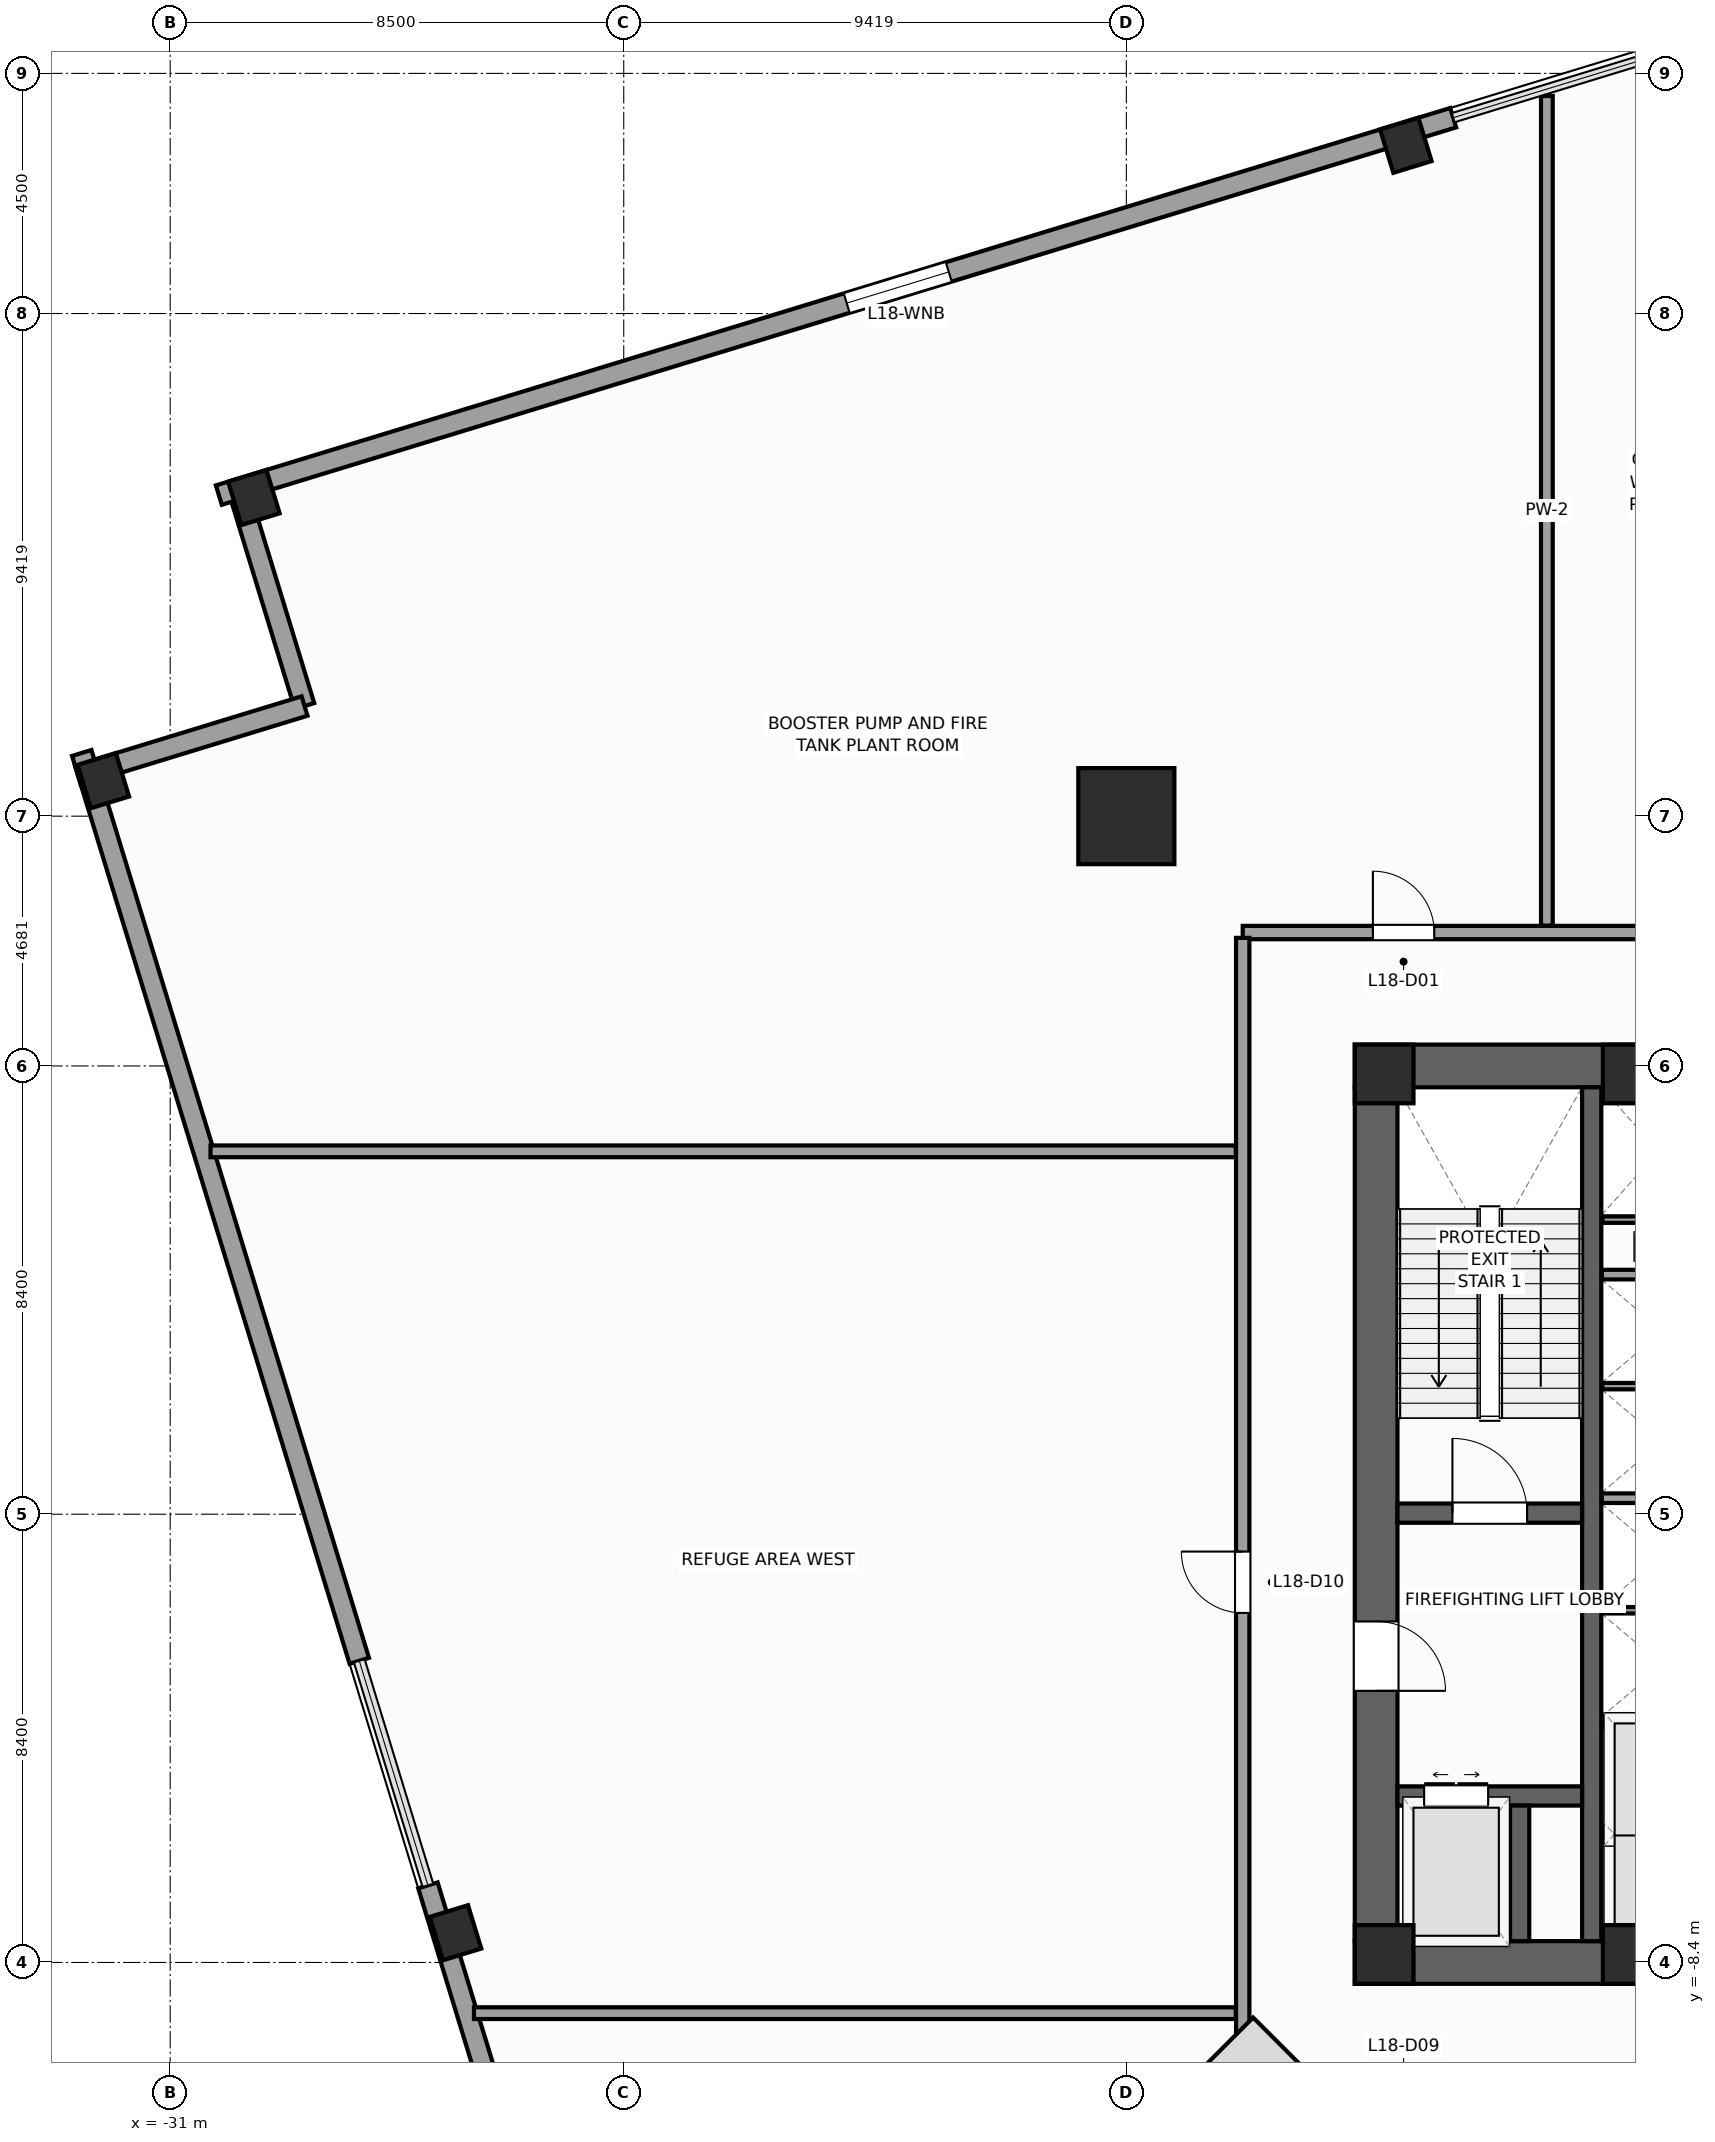
"""IFC4 building model, lengths in metres.
Left out: names, types, materials, properties, quantities, classifications, styles, units other than length and angle.
Written with IfcOpenShell. Run it as: python <this file> out.ifc"""

import sys

from ifc_helpers import new_model, si_unit, direction, frame, frame_2d, origin, origin_2d, place, context, subcontext, project, spatial, rectangle, extrude, source, transform, mapped, element, fill, save


model = new_model("IFC4")
c1 = context("Model", 3, precision=1e-05, world=origin(), true_north=direction((0.0, 1.0)))
c2 = subcontext(c1, "Body", "Model", "MODEL_VIEW")
j1 = project(units=[si_unit("LENGTHUNIT", "METRE"), si_unit("PLANEANGLEUNIT", "RADIAN")], contexts=[c1])
p1 = place(None, origin())
s1 = spatial("IfcSite", under=j1, at=p1, CompositionType="ELEMENT")
p2 = place(p1, origin())
s2 = spatial("IfcBuilding", under=s1, at=p2, CompositionType="ELEMENT")
p3 = place(p2, frame((0.0, 0.0, 78.0)))
s3 = spatial("IfcBuildingStorey", under=s2, at=p3, CompositionType="ELEMENT", Elevation=78.0)
p4 = place(p3, frame((-8.8, -8.4, 0.0), z_axis=(0.0, 0.0, 1.0), x_axis=(1.0, 0.0, 0.0)))
e1 = element("IfcWall", 1, at=p4, inside=s3, PredefinedType="SHEAR", context=c2, shape_type="SweptSolid", body=[
    extrude(rectangle(XDim=17.6, YDim=0.8, at=frame_2d((8.8, 0.0))), origin(), (0.0, 0.0, 1.0), 5.2),
])
p5 = place(p4, frame((8.15, 0.0, 0.0)))
e2 = element("IfcOpeningElement", 2, at=p5, cuts=e1, PredefinedType="OPENING", context=c2, shape_type="SweptSolid", body=[
    extrude(rectangle(XDim=1.3, YDim=2.2, at=frame_2d((0.65, 1.1))), frame((0.0, 0.41, 0.0), z_axis=(0.0, -1.0, 0.0), x_axis=(1.0, 0.0, 0.0)), (0.0, 0.0, 1.0), 0.82),
])
p6 = place(p3, frame((-8.8, 8.4, 0.0), z_axis=(0.0, 0.0, 1.0), x_axis=(1.0, 0.0, 0.0)))
e3 = element("IfcWall", 3, at=p6, inside=s3, PredefinedType="SHEAR", context=c2, shape_type="SweptSolid", body=[
    extrude(rectangle(XDim=17.6, YDim=0.8, at=frame_2d((8.8, 0.0))), origin(), (0.0, 0.0, 1.0), 5.2),
])
p7 = place(p3, frame((-8.4, -8.0, 0.0), z_axis=(0.0, 0.0, 1.0), x_axis=(0.0, 1.0, 0.0)))
e4 = element("IfcWall", 4, at=p7, inside=s3, PredefinedType="SHEAR", context=c2, shape_type="SweptSolid", body=[
    extrude(rectangle(XDim=16.0, YDim=0.8, at=frame_2d((8.0, 0.0))), origin(), (0.0, 0.0, 1.0), 5.2),
])
p8 = place(p7, frame((4.69, 0.0, 0.0)))
e5 = element("IfcOpeningElement", 5, at=p8, cuts=e4, PredefinedType="OPENING", context=c2, shape_type="SweptSolid", body=[
    extrude(rectangle(XDim=1.3, YDim=2.2, at=frame_2d((0.65, 1.1))), frame((0.0, 0.41, 0.0), z_axis=(0.0, -1.0, 0.0), x_axis=(1.0, 0.0, 0.0)), (0.0, 0.0, 1.0), 0.82),
])
p9 = place(p3, frame((-4.36, -8.0, 0.0), z_axis=(0.0, 0.0, 1.0), x_axis=(0.0, 1.0, 0.0)))
e6 = element("IfcWall", 6, at=p9, inside=s3, PredefinedType="SHEAR", context=c2, shape_type="SweptSolid", body=[
    extrude(rectangle(XDim=16.0, YDim=0.36, at=frame_2d((8.0, 0.0))), origin(), (0.0, 0.0, 1.0), 5.2),
])
p10 = place(p3, frame((-8.0, 0.02, 0.0), z_axis=(0.0, 0.0, 1.0), x_axis=(1.0, 0.0, 0.0)))
e7 = element("IfcWall", 7, at=p10, inside=s3, PredefinedType="SHEAR", context=c2, shape_type="SweptSolid", body=[
    extrude(rectangle(XDim=3.46, YDim=0.36, at=frame_2d((1.73, 0.0))), origin(), (0.0, 0.0, 1.0), 5.2),
])
p11 = place(p10, frame((1.03, 0.0, 0.0)))
e8 = element("IfcOpeningElement", 8, at=p11, cuts=e7, PredefinedType="OPENING", context=c2, shape_type="SweptSolid", body=[
    extrude(rectangle(XDim=1.4, YDim=2.2, at=frame_2d((0.7, 1.1))), frame((0.0, 0.19, 0.0), z_axis=(0.0, -1.0, 0.0), x_axis=(1.0, 0.0, 0.0)), (0.0, 0.0, 1.0), 0.38),
])
p12 = place(p3, frame((-8.0, -5.28, 0.0), z_axis=(0.0, 0.0, 1.0), x_axis=(1.0, 0.0, 0.0)))
e9 = element("IfcWall", 9, at=p12, inside=s3, PredefinedType="SHEAR", context=c2, shape_type="SweptSolid", body=[
    extrude(rectangle(XDim=3.46, YDim=0.36, at=frame_2d((1.73, 0.0))), origin(), (0.0, 0.0, 1.0), 5.2),
])
p13 = place(p12, frame((0.5, 0.0, 0.0)))
e10 = element("IfcOpeningElement", 10, at=p13, cuts=e9, PredefinedType="OPENING", context=c2, shape_type="SweptSolid", body=[
    extrude(rectangle(XDim=1.2, YDim=2.25, at=frame_2d((0.6, 1.125))), frame((0.0, 0.19, 0.0), z_axis=(0.0, -1.0, 0.0), x_axis=(1.0, 0.0, 0.0)), (0.0, 0.0, 1.0), 0.38),
])
p14 = place(p3, frame((-5.71, -8.0, 0.0), z_axis=(0.0, 0.0, 1.0), x_axis=(0.0, 1.0, 0.0)))
e11 = element("IfcWall", 11, at=p14, inside=s3, PredefinedType="SHEAR", context=c2, shape_type="SweptSolid", body=[
    extrude(rectangle(XDim=2.54, YDim=0.36, at=frame_2d((1.27, 0.0))), origin(), (0.0, 0.0, 1.0), 5.2),
])
m1 = source(origin(), c2, "Body", "SweptSolid", [
    extrude(rectangle(XDim=1.1, YDim=1.1, at=origin_2d()), origin(), (0.0, 0.0, 1.0), 5.2),
])
for number, where, z_axis, x_axis in (
    (12, (-8.25, -8.25, 0.0), (0.0, 0.0, 1.0), (1.0, 0.0, 0.0)),
    (13, (-8.25, 8.25, 0.0), (0.0, 0.0, 1.0), (1.0, 0.0, 0.0)),
    (14, (-3.6, -8.25, 0.0), (0.0, 0.0, 1.0), (1.0, 0.0, 0.0)),
    (15, (-3.6, 8.25, 0.0), (0.0, 0.0, 1.0), (1.0, 0.0, 0.0)),
):
    element("IfcColumn", number, at=place(p3, frame(where, z_axis=z_axis, x_axis=x_axis)), inside=s3, PredefinedType="PILASTER", context=c2, shape_type="MappedRepresentation", body=[
        mapped(m1, transform((0.0, 0.0, 0.0), scale=1.0)),
    ])
m2 = source(origin(), c2, "Body", "SweptSolid", [
    extrude(rectangle(XDim=1.8, YDim=1.8, at=origin_2d()), origin(), (0.0, 0.0, 1.0), 5.2),
])
p15 = place(p3, frame((-13.081, 13.081, 0.0), z_axis=(0.0, 0.0, 1.0), x_axis=(1.0, 0.0, 0.0)))
e16 = element("IfcColumn", 16, at=p15, inside=s3, PredefinedType="COLUMN", context=c2, shape_type="MappedRepresentation", body=[
    mapped(m2, transform((0.0, 0.0, 0.0), scale=1.0)),
])
m3 = source(origin(), c2, "Body", "SweptSolid", [
    extrude(rectangle(XDim=0.75, YDim=0.85, at=origin_2d()), origin(), (0.0, 0.0, 1.0), 5.2),
])
for number, where, z_axis, x_axis in (
    (17, (-7.843, 25.653, 0.0), (0.0, 0.0, 1.0), (0.956, 0.292, 0.0)),
    (18, (-29.431, 19.052, 0.0), (0.0, 0.0, 1.0), (0.956, 0.292, 0.0)),
    (19, (-32.253, 13.746, 0.0), (0.0, 0.0, 1.0), (0.956, 0.292, 0.0)),
    (20, (-25.653, -7.843, 0.0), (0.0, 0.0, 1.0), (0.956, 0.292, 0.0)),
):
    element("IfcColumn", number, at=place(p3, frame(where, z_axis=z_axis, x_axis=x_axis)), inside=s3, PredefinedType="COLUMN", context=c2, shape_type="MappedRepresentation", body=[
        mapped(m3, transform((0.0, 0.0, 0.0), scale=1.0)),
    ])
p16 = place(p3, frame((-29.725, 19.208, 0.0), z_axis=(0.0, 0.0, 1.0), x_axis=(0.292345507338, -0.956312764915, 0.0)))
e21 = element("IfcWall", 21, at=p16, inside=s3, PredefinedType="STANDARD", context=c2, shape_type="SweptSolid", body=[
    extrude(rectangle(XDim=4.25, YDim=0.38, at=frame_2d((2.125, 0.0))), origin(), (0.0, 0.0, 1.0), 4.94),
])
p17 = place(p3, frame((-28.482, 15.144, 0.0), z_axis=(0.0, 0.0, 1.0), x_axis=(-0.956304176051, -0.292373601522, 0.0)))
e22 = element("IfcWall", 22, at=p17, inside=s3, PredefinedType="STANDARD", context=c2, shape_type="SweptSolid", body=[
    extrude(rectangle(XDim=4.44, YDim=0.38, at=frame_2d((2.22, 0.0))), origin(), (0.0, 0.0, 1.0), 4.24),
])
p18 = place(p3, frame((-6.955, 26.17, 0.0), z_axis=(0.0, 0.0, 1.0), x_axis=(-0.95630447169, -0.292372634538, 0.0)))
e23 = element("IfcWall", 23, at=p18, inside=s3, PredefinedType="STANDARD", context=c2, shape_type="SweptSolid", body=[
    extrude(rectangle(XDim=24.19, YDim=0.38, at=frame_2d((12.095, 0.0))), origin(), (0.0, 0.0, 1.0), 4.34),
])
p19 = place(p18, frame((9.885, 0.0, 0.65)))
e24 = element("IfcOpeningElement", 24, at=p19, cuts=e23, PredefinedType="OPENING", context=c2, shape_type="SweptSolid", body=[
    extrude(rectangle(XDim=2.0, YDim=1.45, at=frame_2d((1.0, 0.725))), frame((0.0, 0.2, 0.0), z_axis=(0.0, -1.0, 0.0), x_axis=(1.0, 0.0, 0.0)), (0.0, 0.0, 1.0), 0.4),
])
p20 = place(p3, frame((-32.658, 14.265, 0.0), z_axis=(0.0, 0.0, 1.0), x_axis=(0.292377517944, -0.956302978664, 0.0)))
e25 = element("IfcWall", 25, at=p20, inside=s3, PredefinedType="STANDARD", context=c2, shape_type="SweptSolid", body=[
    extrude(rectangle(XDim=17.79, YDim=0.38, at=frame_2d((8.895, 0.0))), origin(), (0.0, 0.0, 1.0), 4.34),
])
p21 = place(p3, frame((-26.17, -6.955, 0.0), z_axis=(0.0, 0.0, 1.0), x_axis=(0.292372634538, -0.95630447169, 0.0)))
e26 = element("IfcWall", 26, at=p21, inside=s3, PredefinedType="STANDARD", context=c2, shape_type="SweptSolid", body=[
    extrude(rectangle(XDim=24.19, YDim=0.38, at=frame_2d((12.095, 0.0))), origin(), (0.0, 0.0, 1.0), 4.34),
])
p22 = place(p21, frame((9.885, 0.0, 0.65)))
e27 = element("IfcOpeningElement", 27, at=p22, cuts=e26, PredefinedType="OPENING", context=c2, shape_type="SweptSolid", body=[
    extrude(rectangle(XDim=2.0, YDim=1.45, at=frame_2d((1.0, 0.725))), frame((0.0, 0.2, 0.0), z_axis=(0.0, -1.0, 0.0), x_axis=(1.0, 0.0, 0.0)), (0.0, 0.0, 1.0), 0.4),
])
for number, where, z_axis, x_axis in (
    (28, (-4.17, -3.9, 0.0), (0.0, 0.0, 1.0), (1.0, 0.0, 0.0)),
    (29, (-4.17, 0.3, 0.0), (0.0, 0.0, 1.0), (1.0, 0.0, 0.0)),
    (30, (-4.17, 4.49, 0.0), (0.0, 0.0, 1.0), (1.0, 0.0, 0.0)),
):
    element("IfcWall", number, at=place(p3, frame(where, z_axis=z_axis, x_axis=x_axis)), inside=s3, PredefinedType="PARTITIONING", context=c2, shape_type="SweptSolid", body=[
        extrude(rectangle(XDim=2.28, YDim=0.18, at=frame_2d((1.14, 0.0))), origin(), (0.0, 0.0, 1.0), 4.94),
    ])
for number, where, z_axis, x_axis in (
    (31, (-4.16, -6.0, 0.0), (0.0, 0.0, 1.0), (1.0, 0.0, 0.0)),
    (32, (-4.16, -1.8, 0.0), (0.0, 0.0, 1.0), (1.0, 0.0, 0.0)),
    (33, (-4.16, 2.4, 0.0), (0.0, 0.0, 1.0), (1.0, 0.0, 0.0)),
):
    element("IfcWall", number, at=place(p3, frame(where, z_axis=z_axis, x_axis=x_axis)), inside=s3, PredefinedType="PARTITIONING", context=c2, shape_type="SweptSolid", body=[
        extrude(rectangle(XDim=2.26, YDim=0.12, at=frame_2d((1.13, 0.0))), origin(), (0.0, 0.0, 1.0), 4.94),
    ])
p23 = place(p3, frame((-4.16, 5.52, 0.0), z_axis=(0.0, 0.0, 1.0), x_axis=(1.0, 0.0, 0.0)))
e34 = element("IfcWall", 34, at=p23, inside=s3, PredefinedType="PARTITIONING", context=c2, shape_type="SweptSolid", body=[
    extrude(rectangle(XDim=2.1, YDim=0.12, at=frame_2d((1.05, 0.0))), origin(), (0.0, 0.0, 1.0), 4.94),
])
p24 = place(p3, frame((-10.9, 10.9, 0.0), z_axis=(0.0, 0.0, 1.0), x_axis=(1.0, 0.0, 0.0)))
e35 = element("IfcWall", 35, at=p24, inside=s3, PredefinedType="PARTITIONING", context=c2, shape_type="SweptSolid", body=[
    extrude(rectangle(XDim=21.8, YDim=0.25, at=frame_2d((10.9, 0.0))), origin(), (0.0, 0.0, 1.0), 4.94),
])
p25 = place(p24, frame((2.439, 0.0, 0.0)))
e36 = element("IfcOpeningElement", 36, at=p25, cuts=e35, PredefinedType="OPENING", context=c2, shape_type="SweptSolid", body=[
    extrude(rectangle(XDim=1.15, YDim=2.25, at=frame_2d((0.575, 1.125))), frame((0.0, 0.135, 0.0), z_axis=(0.0, -1.0, 0.0), x_axis=(1.0, 0.0, 0.0)), (0.0, 0.0, 1.0), 0.27),
])
p26 = place(p24, frame((7.725, 0.0, 0.0)))
e37 = element("IfcOpeningElement", 37, at=p26, cuts=e35, PredefinedType="OPENING", context=c2, shape_type="SweptSolid", body=[
    extrude(rectangle(XDim=1.15, YDim=2.25, at=frame_2d((0.575, 1.125))), frame((0.0, 0.135, 0.0), z_axis=(0.0, -1.0, 0.0), x_axis=(1.0, 0.0, 0.0)), (0.0, 0.0, 1.0), 0.27),
])
p27 = place(p24, frame((12.925, 0.0, 0.0)))
e38 = element("IfcOpeningElement", 38, at=p27, cuts=e35, PredefinedType="OPENING", context=c2, shape_type="SweptSolid", body=[
    extrude(rectangle(XDim=1.15, YDim=2.25, at=frame_2d((0.575, 1.125))), frame((0.0, 0.135, 0.0), z_axis=(0.0, -1.0, 0.0), x_axis=(1.0, 0.0, 0.0)), (0.0, 0.0, 1.0), 0.27),
])
p28 = place(p24, frame((18.21, 0.0, 0.0)))
e39 = element("IfcOpeningElement", 39, at=p28, cuts=e35, PredefinedType="OPENING", context=c2, shape_type="SweptSolid", body=[
    extrude(rectangle(XDim=1.15, YDim=2.25, at=frame_2d((0.575, 1.125))), frame((0.0, 0.135, 0.0), z_axis=(0.0, -1.0, 0.0), x_axis=(1.0, 0.0, 0.0)), (0.0, 0.0, 1.0), 0.27),
])
p29 = place(p3, frame((-10.9, -10.8, 0.0), z_axis=(0.0, 0.0, 1.0), x_axis=(0.0, 1.0, 0.0)))
e40 = element("IfcWall", 40, at=p29, inside=s3, PredefinedType="PARTITIONING", context=c2, shape_type="SweptSolid", body=[
    extrude(rectangle(XDim=21.6, YDim=0.25, at=frame_2d((10.8, 0.0))), origin(), (0.0, 0.0, 1.0), 4.94),
])
p30 = place(p29, frame((8.95, 0.0, 0.0)))
e41 = element("IfcOpeningElement", 41, at=p30, cuts=e40, PredefinedType="OPENING", context=c2, shape_type="SweptSolid", body=[
    extrude(rectangle(XDim=1.15, YDim=2.25, at=frame_2d((0.575, 1.125))), frame((0.0, 0.135, 0.0), z_axis=(0.0, -1.0, 0.0), x_axis=(1.0, 0.0, 0.0)), (0.0, 0.0, 1.0), 0.27),
])
p31 = place(p3, frame((-5.2, 11.03, 0.0), z_axis=(0.0, 0.0, 1.0), x_axis=(0.0, 1.0, 0.0)))
e42 = element("IfcWall", 42, at=p31, inside=s3, PredefinedType="PARTITIONING", context=c2, shape_type="SweptSolid", body=[
    extrude(rectangle(XDim=15.546, YDim=0.22, at=frame_2d((7.773, 0.0))), origin(), (0.0, 0.0, 1.0), 4.94),
])
p32 = place(p3, frame((-11.03, -9.35, 0.0), z_axis=(0.0, 0.0, 1.0), x_axis=(-1.0, 0.0, 0.0)))
e43 = element("IfcWall", 43, at=p32, inside=s3, PredefinedType="PARTITIONING", context=c2, shape_type="SweptSolid", body=[
    extrude(rectangle(XDim=14.277, YDim=0.22, at=frame_2d((7.139, 0.0))), origin(), (0.0, 0.0, 1.0), 4.24),
])
p33 = place(p3, frame((-11.03, 6.8, 0.0), z_axis=(0.0, 0.0, 1.0), x_axis=(-1.0, 0.0, 0.0)))
e44 = element("IfcWall", 44, at=p33, inside=s3, PredefinedType="PARTITIONING", context=c2, shape_type="SweptSolid", body=[
    extrude(rectangle(XDim=19.215, YDim=0.22, at=frame_2d((9.607, 0.0))), origin(), (0.0, 0.0, 1.0), 4.94),
])
m4 = source(origin(), c2, "Body", "SweptSolid", [
    extrude(rectangle(XDim=2.0, YDim=1.45, at=frame_2d((1.0, 0.725))), frame((0.0, 0.03, 0.0), z_axis=(0.0, -1.0, 0.0), x_axis=(1.0, 0.0, 0.0)), (0.0, 0.0, 1.0), 0.06),
])
p34 = place(p19, origin())
e45 = element("IfcWindow", 45, at=p34, inside=s3, PartitioningType="SINGLE_PANEL", PredefinedType="WINDOW", context=c2, shape_type="MappedRepresentation", body=[
    mapped(m4, transform((0.0, 0.0, 0.0), scale=1.0)),
])
fill(e24, e45)
m5 = source(origin(), c2, "Body", "SweptSolid", [
    extrude(rectangle(XDim=1.4, YDim=2.2, at=frame_2d((0.7, 1.1))), frame((0.0, 0.025, 0.0), z_axis=(0.0, -1.0, 0.0), x_axis=(1.0, 0.0, 0.0)), (0.0, 0.0, 1.0), 0.05),
])
p35 = place(p11, origin())
e46 = element("IfcDoor", 46, at=p35, inside=s3, OperationType="SINGLE_SWING_LEFT", PredefinedType="DOOR", context=c2, shape_type="MappedRepresentation", body=[
    mapped(m5, transform((0.0, 0.0, 0.0), scale=1.0)),
])
fill(e8, e46)
m6 = source(origin(), c2, "Body", "SweptSolid", [
    extrude(rectangle(XDim=1.3, YDim=2.2, at=frame_2d((0.65, 1.1))), frame((0.0, 0.025, 0.0), z_axis=(0.0, -1.0, 0.0), x_axis=(1.0, 0.0, 0.0)), (0.0, 0.0, 1.0), 0.05),
])
p36 = place(p8, frame((1.3, 0.0, 0.0), z_axis=(0.0, 0.0, 1.0), x_axis=(-1.0, 0.0, 0.0)))
e47 = element("IfcDoor", 47, at=p36, inside=s3, OperationType="SINGLE_SWING_LEFT", PredefinedType="DOOR", context=c2, shape_type="MappedRepresentation", body=[
    mapped(m6, transform((0.0, 0.0, 0.0), scale=1.0)),
])
fill(e5, e47)
m7 = source(origin(), c2, "Body", "SweptSolid", [
    extrude(rectangle(XDim=1.2, YDim=2.25, at=frame_2d((0.6, 1.125))), frame((0.0, 0.025, 0.0), z_axis=(0.0, -1.0, 0.0), x_axis=(1.0, 0.0, 0.0)), (0.0, 0.0, 1.0), 0.05),
])
p37 = place(p13, origin())
e48 = element("IfcDoor", 48, at=p37, inside=s3, OperationType="DOUBLE_DOOR_SLIDING", PredefinedType="DOOR", context=c2, shape_type="MappedRepresentation", body=[
    mapped(m7, transform((0.0, 0.0, 0.0), scale=1.0)),
])
fill(e10, e48)
m8 = source(origin(), c2, "Body", "SweptSolid", [
    extrude(rectangle(XDim=1.15, YDim=2.25, at=frame_2d((0.575, 1.125))), frame((0.0, 0.025, 0.0), z_axis=(0.0, -1.0, 0.0), x_axis=(1.0, 0.0, 0.0)), (0.0, 0.0, 1.0), 0.05),
])
p38 = place(p25, origin())
e49 = element("IfcDoor", 49, at=p38, inside=s3, OperationType="SINGLE_SWING_LEFT", PredefinedType="DOOR", context=c2, shape_type="MappedRepresentation", body=[
    mapped(m8, transform((0.0, 0.0, 0.0), scale=1.0)),
])
fill(e36, e49)
p39 = place(p30, origin())
e50 = element("IfcDoor", 50, at=p39, inside=s3, OperationType="SINGLE_SWING_RIGHT", PredefinedType="DOOR", context=c2, shape_type="MappedRepresentation", body=[
    mapped(m8, transform((0.0, 0.0, 0.0), scale=1.0)),
])
fill(e41, e50)
save(model, sys.argv[1])
